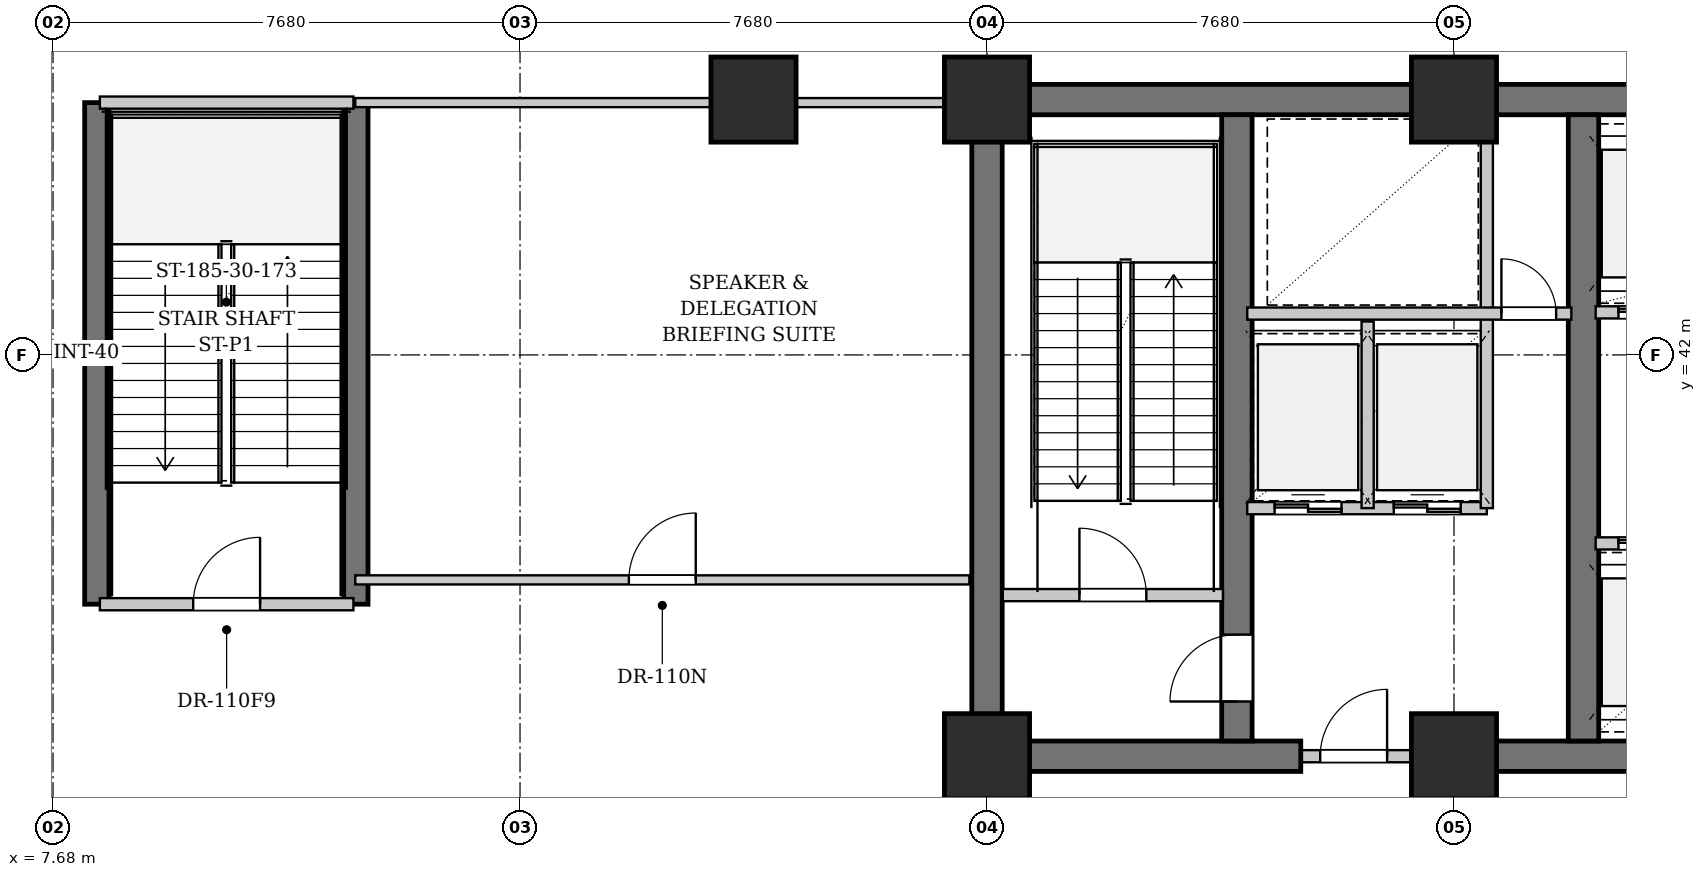
"""IFC4 building model, lengths in metres.
Left out: names, types, materials, properties, quantities, classifications, styles, units other than length and angle.
Written with IfcOpenShell. Run it as: python <this file> out.ifc"""

import sys

from ifc_helpers import new_model, si_unit, direction, frame, frame_2d, origin, origin_2d, place, context, subcontext, project, spatial, rectangle, extrude, element, fill, save


model = new_model("IFC4")
c1 = context("Model", 3, precision=1e-05, world=origin(), true_north=direction((0.0, 1.0)))
c2 = subcontext(c1, "Body", "Model", "MODEL_VIEW")
j1 = project(units=[si_unit("LENGTHUNIT", "METRE"), si_unit("PLANEANGLEUNIT", "RADIAN")], contexts=[c1])
p1 = place(None, origin())
s1 = spatial("IfcSite", under=j1, at=p1, CompositionType="ELEMENT")
p2 = place(p1, origin())
s2 = spatial("IfcBuilding", under=s1, at=p2, CompositionType="ELEMENT")
p3 = place(p2, frame((0.0, 0.0, 10.4)))
s3 = spatial("IfcBuildingStorey", under=s2, at=p3, CompositionType="ELEMENT", Elevation=10.4)
p4 = place(p3, frame((22.79, 46.2, 0.0), z_axis=(0.0, 0.0, 1.0), x_axis=(1.0, 0.0, 0.0)))
e1 = element("IfcWall", 1, at=p4, inside=s3, PredefinedType="SHEAR", context=c2, shape_type="SweptSolid", body=[
    extrude(rectangle(XDim=31.22, YDim=0.5, at=frame_2d((15.61, 0.0))), origin(), (0.0, 0.0, 1.0), 4.94),
])
p5 = place(p3, frame((22.79, 35.4, 0.0), z_axis=(0.0, 0.0, 1.0), x_axis=(1.0, 0.0, 0.0)))
e2 = element("IfcWall", 2, at=p5, inside=s3, PredefinedType="SHEAR", context=c2, shape_type="SweptSolid", body=[
    extrude(rectangle(XDim=5.41, YDim=0.5, at=frame_2d((2.705, 0.0))), origin(), (0.0, 0.0, 1.0), 4.94),
])
p6 = place(p3, frame((30.72, 35.4, 0.0), z_axis=(0.0, 0.0, 1.0), x_axis=(1.0, 0.0, 0.0)))
e3 = element("IfcWall", 3, at=p6, inside=s3, PredefinedType="SHEAR", context=c2, shape_type="SweptSolid", body=[
    extrude(rectangle(XDim=4.88, YDim=0.5, at=frame_2d((2.44, 0.0))), origin(), (0.0, 0.0, 1.0), 4.94),
])
p7 = place(p3, frame((23.04, 35.65, 0.0), z_axis=(0.0, 0.0, 1.0), x_axis=(0.0, 1.0, 0.0)))
e4 = element("IfcWall", 4, at=p7, inside=s3, PredefinedType="SHEAR", context=c2, shape_type="SweptSolid", body=[
    extrude(rectangle(XDim=10.3, YDim=0.5, at=frame_2d((5.15, 0.0))), origin(), (0.0, 0.0, 1.0), 4.94),
])
p8 = place(p3, frame((27.15, 35.65, 0.0), z_axis=(0.0, 0.0, 1.0), x_axis=(0.0, 1.0, 0.0)))
e5 = element("IfcWall", 5, at=p8, inside=s3, PredefinedType="SHEAR", context=c2, shape_type="SweptSolid", body=[
    extrude(rectangle(XDim=10.3, YDim=0.5, at=frame_2d((5.15, 0.0))), origin(), (0.0, 0.0, 1.0), 4.94),
])
p9 = place(p8, frame((0.65, 0.0, 0.0)))
e6 = element("IfcOpeningElement", 6, at=p9, cuts=e5, PredefinedType="OPENING", context=c2, shape_type="SweptSolid", body=[
    extrude(rectangle(XDim=1.1, YDim=2.15, at=frame_2d((0.55, 1.075))), frame((0.0, 0.26, 0.0), z_axis=(0.0, -1.0, 0.0), x_axis=(1.0, 0.0, 0.0)), (0.0, 0.0, 1.0), 0.52),
])
p10 = place(p3, frame((32.85, 35.65, 0.0), z_axis=(0.0, 0.0, 1.0), x_axis=(0.0, 1.0, 0.0)))
e7 = element("IfcWall", 7, at=p10, inside=s3, PredefinedType="SHEAR", context=c2, shape_type="SweptSolid", body=[
    extrude(rectangle(XDim=10.3, YDim=0.5, at=frame_2d((5.15, 0.0))), origin(), (0.0, 0.0, 1.0), 4.94),
])
for number, where, z_axis, x_axis in (
    (8, (8.4, 37.9, 0.0), (0.0, 0.0, 1.0), (0.0, 1.0, 0.0)),
    (9, (12.66, 37.9, 0.0), (0.0, 0.0, 1.0), (0.0, 1.0, 0.0)),
):
    element("IfcWall", number, at=place(p3, frame(where, z_axis=z_axis, x_axis=x_axis)), inside=s3, PredefinedType="SHEAR", context=c2, shape_type="SweptSolid", body=[
        extrude(rectangle(XDim=8.25, YDim=0.4, at=frame_2d((4.125, 0.0))), origin(), (0.0, 0.0, 1.0), 4.94),
    ])
for number, where, z_axis, x_axis in (
    (10, (23.04, 35.4, 0.0), (0.0, 0.0, 1.0), (1.0, 0.0, 0.0)),
    (11, (23.04, 46.2, 0.0), (0.0, 0.0, 1.0), (1.0, 0.0, 0.0)),
    (12, (30.72, 35.4, 0.0), (0.0, 0.0, 1.0), (1.0, 0.0, 0.0)),
    (13, (30.72, 46.2, 0.0), (0.0, 0.0, 1.0), (1.0, 0.0, 0.0)),
    (14, (19.2, 46.2, 0.0), (0.0, 0.0, 1.0), (1.0, 0.0, 0.0)),
):
    element("IfcColumn", number, at=place(p3, frame(where, z_axis=z_axis, x_axis=x_axis)), inside=s3, PredefinedType="COLUMN", context=c2, shape_type="SweptSolid", body=[
        extrude(rectangle(XDim=1.4, YDim=1.4, at=origin_2d()), origin(), (0.0, 0.0, 1.0), 5.2),
    ])
p11 = place(p3, frame((23.3, 38.05, 0.0), z_axis=(0.0, 0.0, 1.0), x_axis=(1.0, 0.0, 0.0)))
e15 = element("IfcWall", 15, at=p11, inside=s3, PredefinedType="PARTITIONING", context=c2, shape_type="SweptSolid", body=[
    extrude(rectangle(XDim=3.62, YDim=0.2, at=frame_2d((1.81, 0.0))), origin(), (0.0, 0.0, 1.0), 4.94),
])
p12 = place(p11, frame((1.26, 0.0, 0.0)))
e16 = element("IfcOpeningElement", 16, at=p12, cuts=e15, PredefinedType="OPENING", context=c2, shape_type="SweptSolid", body=[
    extrude(rectangle(XDim=1.1, YDim=2.15, at=frame_2d((0.55, 1.075))), frame((0.0, 0.11, 0.0), z_axis=(0.0, -1.0, 0.0), x_axis=(1.0, 0.0, 0.0)), (0.0, 0.0, 1.0), 0.22),
])
p13 = place(p3, frame((28.22, 35.4, 0.0), z_axis=(0.0, 0.0, 1.0), x_axis=(1.0, 0.0, 0.0)))
e17 = element("IfcWall", 17, at=p13, inside=s3, PredefinedType="PARTITIONING", context=c2, shape_type="SweptSolid", body=[
    extrude(rectangle(XDim=2.5, YDim=0.2, at=frame_2d((1.25, 0.0))), origin(), (0.0, 0.0, 1.0), 4.035),
])
p14 = place(p13, frame((0.3, 0.0, 0.0)))
e18 = element("IfcOpeningElement", 18, at=p14, cuts=e17, PredefinedType="OPENING", context=c2, shape_type="SweptSolid", body=[
    extrude(rectangle(XDim=1.1, YDim=2.15, at=frame_2d((0.55, 1.075))), frame((0.0, 0.11, 0.0), z_axis=(0.0, -1.0, 0.0), x_axis=(1.0, 0.0, 0.0)), (0.0, 0.0, 1.0), 0.22),
])
p15 = place(p3, frame((27.32, 39.48, 0.0), z_axis=(0.0, 0.0, 1.0), x_axis=(1.0, 0.0, 0.0)))
e19 = element("IfcWall", 19, at=p15, inside=s3, PredefinedType="PARTITIONING", context=c2, shape_type="SweptSolid", body=[
    extrude(rectangle(XDim=3.94, YDim=0.2, at=frame_2d((1.97, 0.0))), origin(), (0.0, 0.0, 1.0), 4.94),
])
p16 = place(p15, frame((0.45, 0.0, 0.0)))
e20 = element("IfcOpeningElement", 20, at=p16, cuts=e19, PredefinedType="OPENING", context=c2, shape_type="SweptSolid", body=[
    extrude(rectangle(XDim=1.1, YDim=2.2, at=frame_2d((0.55, 1.1))), frame((0.0, 0.11, 0.0), z_axis=(0.0, -1.0, 0.0), x_axis=(1.0, 0.0, 0.0)), (0.0, 0.0, 1.0), 0.22),
])
p17 = place(p15, frame((2.41, 0.0, 0.0)))
e21 = element("IfcOpeningElement", 21, at=p17, cuts=e19, PredefinedType="OPENING", context=c2, shape_type="SweptSolid", body=[
    extrude(rectangle(XDim=1.1, YDim=2.2, at=frame_2d((0.55, 1.1))), frame((0.0, 0.11, 0.0), z_axis=(0.0, -1.0, 0.0), x_axis=(1.0, 0.0, 0.0)), (0.0, 0.0, 1.0), 0.22),
])
p18 = place(p3, frame((29.3, 39.48, 0.0), z_axis=(0.0, 0.0, 1.0), x_axis=(0.0, 1.0, 0.0)))
e22 = element("IfcWall", 22, at=p18, inside=s3, PredefinedType="PARTITIONING", context=c2, shape_type="SweptSolid", body=[
    extrude(rectangle(XDim=3.07, YDim=0.2, at=frame_2d((1.535, 0.0))), origin(), (0.0, 0.0, 1.0), 4.94),
])
p19 = place(p3, frame((31.26, 39.48, 0.0), z_axis=(0.0, 0.0, 1.0), x_axis=(0.0, 1.0, 0.0)))
e23 = element("IfcWall", 23, at=p19, inside=s3, PredefinedType="PARTITIONING", context=c2, shape_type="SweptSolid", body=[
    extrude(rectangle(XDim=6.44, YDim=0.2, at=frame_2d((3.22, 0.0))), origin(), (0.0, 0.0, 1.0), 4.94),
])
p20 = place(p3, frame((27.32, 42.68, 0.0), z_axis=(0.0, 0.0, 1.0), x_axis=(1.0, 0.0, 0.0)))
e24 = element("IfcWall", 24, at=p20, inside=s3, PredefinedType="PARTITIONING", context=c2, shape_type="SweptSolid", body=[
    extrude(rectangle(XDim=5.33, YDim=0.2, at=frame_2d((2.665, 0.0))), origin(), (0.0, 0.0, 1.0), 4.94),
])
p21 = place(p20, frame((4.18, 0.0, 0.0)))
e25 = element("IfcOpeningElement", 25, at=p21, cuts=e24, PredefinedType="OPENING", context=c2, shape_type="SweptSolid", body=[
    extrude(rectangle(XDim=0.9, YDim=2.15, at=frame_2d((0.45, 1.075))), frame((0.0, 0.11, 0.0), z_axis=(0.0, -1.0, 0.0), x_axis=(1.0, 0.0, 0.0)), (0.0, 0.0, 1.0), 0.22),
])
p22 = place(p3, frame((33.05, 38.9, 0.0), z_axis=(0.0, 0.0, 1.0), x_axis=(1.0, 0.0, 0.0)))
e26 = element("IfcWall", 26, at=p22, inside=s3, PredefinedType="PARTITIONING", context=c2, shape_type="SweptSolid", body=[
    extrude(rectangle(XDim=3.57, YDim=0.2, at=frame_2d((1.785, 0.0))), origin(), (0.0, 0.0, 1.0), 4.94),
])
p23 = place(p22, frame((0.375, 0.0, 0.0)))
e27 = element("IfcOpeningElement", 27, at=p23, cuts=e26, PredefinedType="OPENING", context=c2, shape_type="SweptSolid", body=[
    extrude(rectangle(XDim=1.0, YDim=2.2, at=frame_2d((0.5, 1.1))), frame((0.0, 0.11, 0.0), z_axis=(0.0, -1.0, 0.0), x_axis=(1.0, 0.0, 0.0)), (0.0, 0.0, 1.0), 0.22),
])
p24 = place(p22, frame((2.125, 0.0, 0.0)))
e28 = element("IfcOpeningElement", 28, at=p24, cuts=e26, PredefinedType="OPENING", context=c2, shape_type="SweptSolid", body=[
    extrude(rectangle(XDim=1.0, YDim=2.2, at=frame_2d((0.5, 1.1))), frame((0.0, 0.11, 0.0), z_axis=(0.0, -1.0, 0.0), x_axis=(1.0, 0.0, 0.0)), (0.0, 0.0, 1.0), 0.22),
])
p25 = place(p3, frame((33.05, 42.7, 0.0), z_axis=(0.0, 0.0, 1.0), x_axis=(1.0, 0.0, 0.0)))
e29 = element("IfcWall", 29, at=p25, inside=s3, PredefinedType="PARTITIONING", context=c2, shape_type="SweptSolid", body=[
    extrude(rectangle(XDim=3.57, YDim=0.2, at=frame_2d((1.785, 0.0))), origin(), (0.0, 0.0, 1.0), 4.94),
])
p26 = place(p25, frame((0.375, 0.0, 0.0)))
e30 = element("IfcOpeningElement", 30, at=p26, cuts=e29, PredefinedType="OPENING", context=c2, shape_type="SweptSolid", body=[
    extrude(rectangle(XDim=1.0, YDim=2.2, at=frame_2d((0.5, 1.1))), frame((0.0, 0.11, 0.0), z_axis=(0.0, -1.0, 0.0), x_axis=(1.0, 0.0, 0.0)), (0.0, 0.0, 1.0), 0.22),
])
p27 = place(p25, frame((2.125, 0.0, 0.0)))
e31 = element("IfcOpeningElement", 31, at=p27, cuts=e29, PredefinedType="OPENING", context=c2, shape_type="SweptSolid", body=[
    extrude(rectangle(XDim=1.0, YDim=2.2, at=frame_2d((0.5, 1.1))), frame((0.0, 0.11, 0.0), z_axis=(0.0, -1.0, 0.0), x_axis=(1.0, 0.0, 0.0)), (0.0, 0.0, 1.0), 0.22),
])
p28 = place(p3, frame((8.45, 37.9, 0.0), z_axis=(0.0, 0.0, 1.0), x_axis=(1.0, 0.0, 0.0)))
e32 = element("IfcWall", 32, at=p28, inside=s3, PredefinedType="PARTITIONING", context=c2, shape_type="SweptSolid", body=[
    extrude(rectangle(XDim=4.17, YDim=0.2, at=frame_2d((2.085, 0.0))), origin(), (0.0, 0.0, 1.0), 4.94),
])
p29 = place(p28, frame((1.535, 0.0, 0.0)))
e33 = element("IfcOpeningElement", 33, at=p29, cuts=e32, PredefinedType="OPENING", context=c2, shape_type="SweptSolid", body=[
    extrude(rectangle(XDim=1.1, YDim=2.15, at=frame_2d((0.55, 1.075))), frame((0.0, 0.11, 0.0), z_axis=(0.0, -1.0, 0.0), x_axis=(1.0, 0.0, 0.0)), (0.0, 0.0, 1.0), 0.22),
])
p30 = place(p3, frame((8.45, 46.15, 0.0), z_axis=(0.0, 0.0, 1.0), x_axis=(1.0, 0.0, 0.0)))
e34 = element("IfcWall", 34, at=p30, inside=s3, PredefinedType="PARTITIONING", context=c2, shape_type="SweptSolid", body=[
    extrude(rectangle(XDim=4.17, YDim=0.2, at=frame_2d((2.085, 0.0))), origin(), (0.0, 0.0, 1.0), 4.94),
])
p31 = place(p3, frame((12.65, 38.3, 0.0), z_axis=(0.0, 0.0, 1.0), x_axis=(1.0, 0.0, 0.0)))
e35 = element("IfcWall", 35, at=p31, inside=s3, PredefinedType="PARTITIONING", context=c2, shape_type="SweptSolid", body=[
    extrude(rectangle(XDim=10.1, YDim=0.15, at=frame_2d((5.05, 0.0))), origin(), (0.0, 0.0, 1.0), 4.94),
])
p32 = place(p31, frame((4.5, 0.0, 0.0)))
e36 = element("IfcOpeningElement", 36, at=p32, cuts=e35, PredefinedType="OPENING", context=c2, shape_type="SweptSolid", body=[
    extrude(rectangle(XDim=1.1, YDim=2.15, at=frame_2d((0.55, 1.075))), frame((0.0, 0.085, 0.0), z_axis=(0.0, -1.0, 0.0), x_axis=(1.0, 0.0, 0.0)), (0.0, 0.0, 1.0), 0.17),
])
p33 = place(p3, frame((12.65, 46.15, 0.0), z_axis=(0.0, 0.0, 1.0), x_axis=(1.0, 0.0, 0.0)))
e37 = element("IfcWall", 37, at=p33, inside=s3, PredefinedType="PARTITIONING", context=c2, shape_type="SweptSolid", body=[
    extrude(rectangle(XDim=10.1, YDim=0.15, at=frame_2d((5.05, 0.0))), origin(), (0.0, 0.0, 1.0), 4.94),
])
p34 = place(p12, origin())
e38 = element("IfcDoor", 38, at=p34, inside=s3, OperationType="SINGLE_SWING_LEFT", PredefinedType="DOOR", context=c2, shape_type="SweptSolid", body=[
    extrude(rectangle(XDim=1.1, YDim=2.15, at=frame_2d((0.55, 1.075))), frame((0.0, 0.025, 0.0), z_axis=(0.0, -1.0, 0.0), x_axis=(1.0, 0.0, 0.0)), (0.0, 0.0, 1.0), 0.05),
])
fill(e16, e38)
p35 = place(p14, origin())
e39 = element("IfcDoor", 39, at=p35, inside=s3, OperationType="SINGLE_SWING_RIGHT", PredefinedType="DOOR", context=c2, shape_type="SweptSolid", body=[
    extrude(rectangle(XDim=1.1, YDim=2.15, at=frame_2d((0.55, 1.075))), frame((0.0, 0.025, 0.0), z_axis=(0.0, -1.0, 0.0), x_axis=(1.0, 0.0, 0.0)), (0.0, 0.0, 1.0), 0.05),
])
fill(e18, e39)
p36 = place(p16, origin())
e40 = element("IfcDoor", 40, at=p36, inside=s3, OperationType="DOUBLE_DOOR_SLIDING", PredefinedType="DOOR", context=c2, shape_type="SweptSolid", body=[
    extrude(rectangle(XDim=1.1, YDim=2.2, at=frame_2d((0.55, 1.1))), frame((0.0, 0.025, 0.0), z_axis=(0.0, -1.0, 0.0), x_axis=(1.0, 0.0, 0.0)), (0.0, 0.0, 1.0), 0.05),
])
fill(e20, e40)
p37 = place(p17, origin())
e41 = element("IfcDoor", 41, at=p37, inside=s3, OperationType="DOUBLE_DOOR_SLIDING", PredefinedType="DOOR", context=c2, shape_type="SweptSolid", body=[
    extrude(rectangle(XDim=1.1, YDim=2.2, at=frame_2d((0.55, 1.1))), frame((0.0, 0.025, 0.0), z_axis=(0.0, -1.0, 0.0), x_axis=(1.0, 0.0, 0.0)), (0.0, 0.0, 1.0), 0.05),
])
fill(e21, e41)
p38 = place(p21, origin())
e42 = element("IfcDoor", 42, at=p38, inside=s3, OperationType="SINGLE_SWING_LEFT", PredefinedType="DOOR", context=c2, shape_type="SweptSolid", body=[
    extrude(rectangle(XDim=0.9, YDim=2.15, at=frame_2d((0.45, 1.075))), frame((0.0, 0.025, 0.0), z_axis=(0.0, -1.0, 0.0), x_axis=(1.0, 0.0, 0.0)), (0.0, 0.0, 1.0), 0.05),
])
fill(e25, e42)
p39 = place(p23, origin())
e43 = element("IfcDoor", 43, at=p39, inside=s3, OperationType="DOUBLE_DOOR_SLIDING", PredefinedType="DOOR", context=c2, shape_type="SweptSolid", body=[
    extrude(rectangle(XDim=1.0, YDim=2.2, at=frame_2d((0.5, 1.1))), frame((0.0, 0.025, 0.0), z_axis=(0.0, -1.0, 0.0), x_axis=(1.0, 0.0, 0.0)), (0.0, 0.0, 1.0), 0.05),
])
fill(e27, e43)
p40 = place(p26, origin())
e44 = element("IfcDoor", 44, at=p40, inside=s3, OperationType="DOUBLE_DOOR_SLIDING", PredefinedType="DOOR", context=c2, shape_type="SweptSolid", body=[
    extrude(rectangle(XDim=1.0, YDim=2.2, at=frame_2d((0.5, 1.1))), frame((0.0, 0.025, 0.0), z_axis=(0.0, -1.0, 0.0), x_axis=(1.0, 0.0, 0.0)), (0.0, 0.0, 1.0), 0.05),
])
fill(e30, e44)
p41 = place(p29, origin())
e45 = element("IfcDoor", 45, at=p41, inside=s3, OperationType="SINGLE_SWING_RIGHT", PredefinedType="DOOR", context=c2, shape_type="SweptSolid", body=[
    extrude(rectangle(XDim=1.1, YDim=2.15, at=frame_2d((0.55, 1.075))), frame((0.0, 0.025, 0.0), z_axis=(0.0, -1.0, 0.0), x_axis=(1.0, 0.0, 0.0)), (0.0, 0.0, 1.0), 0.05),
])
fill(e33, e45)
p42 = place(p32, origin())
e46 = element("IfcDoor", 46, at=p42, inside=s3, OperationType="SINGLE_SWING_RIGHT", PredefinedType="DOOR", context=c2, shape_type="SweptSolid", body=[
    extrude(rectangle(XDim=1.1, YDim=2.15, at=frame_2d((0.55, 1.075))), frame((0.0, 0.025, 0.0), z_axis=(0.0, -1.0, 0.0), x_axis=(1.0, 0.0, 0.0)), (0.0, 0.0, 1.0), 0.05),
])
fill(e36, e46)
p43 = place(p9, origin())
e47 = element("IfcDoor", 47, at=p43, inside=s3, OperationType="SINGLE_SWING_LEFT", PredefinedType="DOOR", context=c2, shape_type="SweptSolid", body=[
    extrude(rectangle(XDim=1.1, YDim=2.15, at=frame_2d((0.55, 1.075))), frame((0.0, 0.025, 0.0), z_axis=(0.0, -1.0, 0.0), x_axis=(1.0, 0.0, 0.0)), (0.0, 0.0, 1.0), 0.05),
])
fill(e6, e47)
save(model, sys.argv[1])
